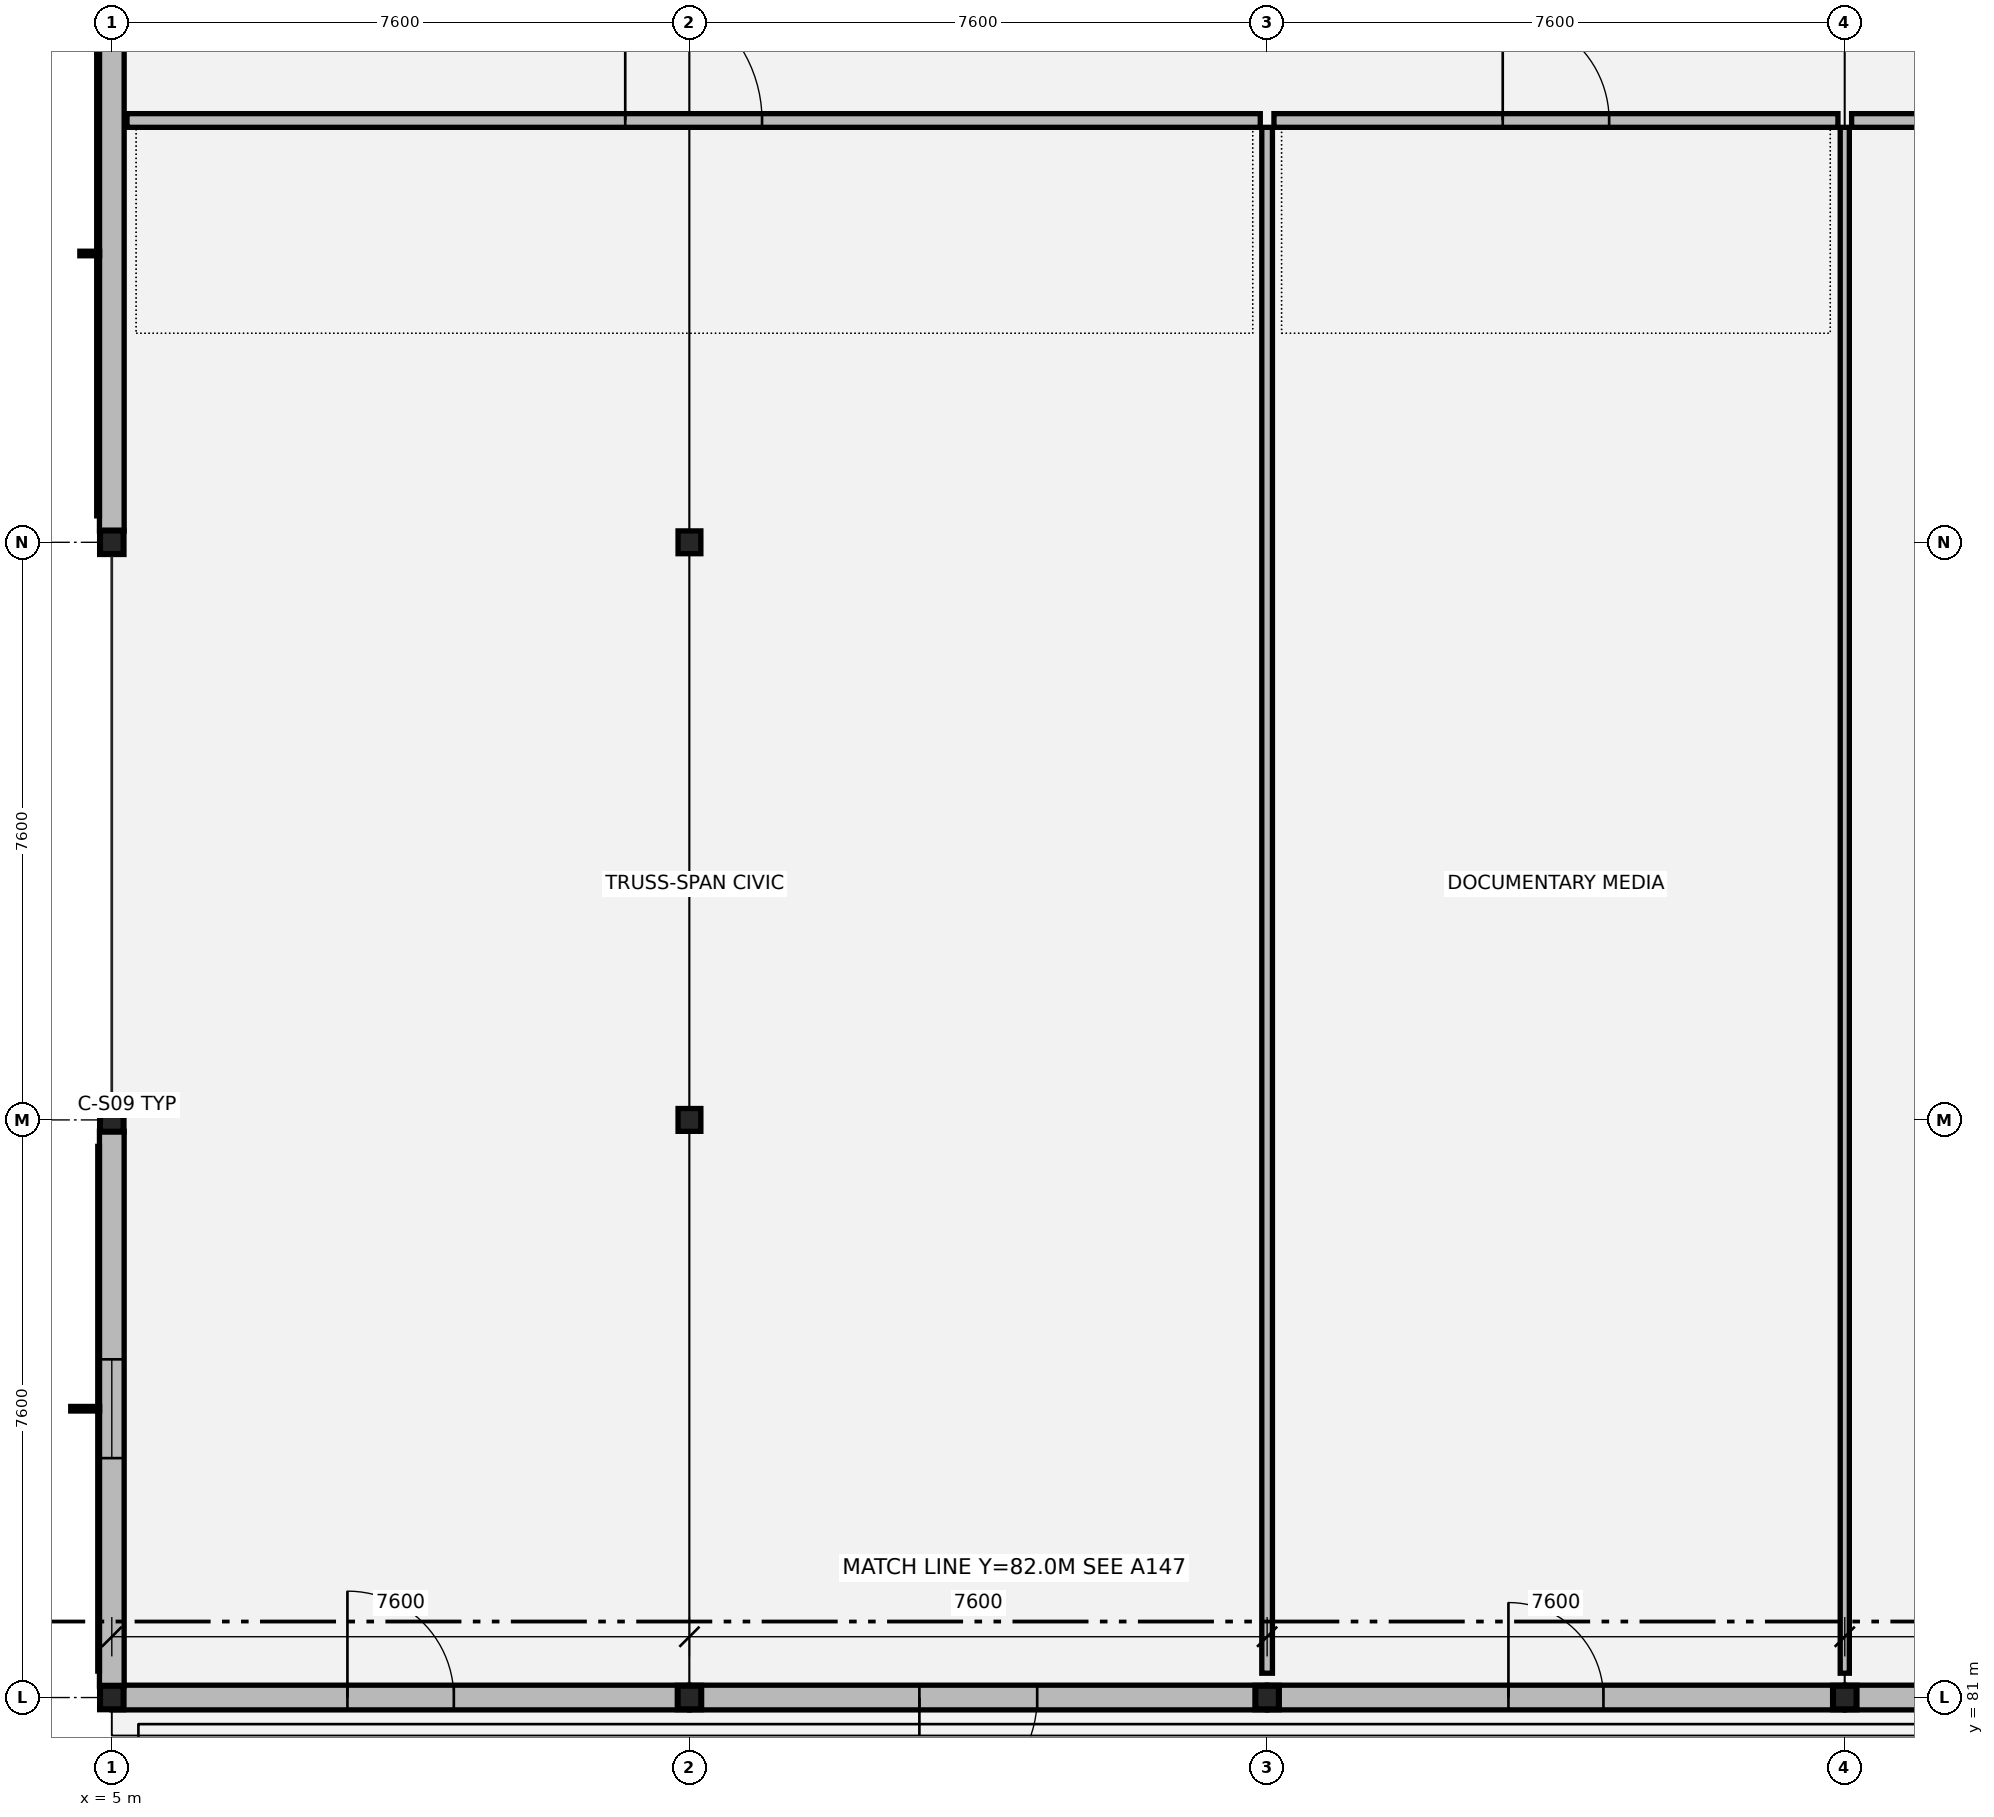
"""IFC4 building model, lengths in metres.
Left out: names, types, materials, properties, quantities, classifications, styles, units other than length and angle.
Written with IfcOpenShell. Run it as: python <this file> out.ifc"""

import sys

from ifc_helpers import new_model, si_unit, direction, frame, frame_2d, origin, origin_2d, place, context, subcontext, project, spatial, rectangle, i_section, extrude, element, fill, save


model = new_model("IFC4")
c1 = context("Model", 3, precision=1e-05, world=origin(), true_north=direction((0.0, 1.0)))
c2 = subcontext(c1, "Body", "Model", "MODEL_VIEW")
j1 = project(units=[si_unit("LENGTHUNIT", "METRE"), si_unit("PLANEANGLEUNIT", "RADIAN")], contexts=[c1])
p1 = place(None, origin())
s1 = spatial("IfcSite", under=j1, at=p1, CompositionType="ELEMENT")
p2 = place(p1, origin())
s2 = spatial("IfcBuilding", under=s1, at=p2, CompositionType="ELEMENT")
p3 = place(p2, frame((0.0, 0.0, 13.26)))
s3 = spatial("IfcBuildingStorey", under=s2, at=p3, CompositionType="ELEMENT", Elevation=13.26)
for number, where, z_axis, x_axis in (
    (1, (5.0, 81.0, 0.0), (0.0, 0.0, 1.0), (1.0, 0.0, 0.0)),
    (2, (5.0, 88.6, 0.0), (0.0, 0.0, 1.0), (1.0, 0.0, 0.0)),
    (3, (5.0, 96.2, 0.0), (0.0, 0.0, 1.0), (1.0, 0.0, 0.0)),
    (4, (12.6, 81.0, 0.0), (0.0, 0.0, 1.0), (1.0, 0.0, 0.0)),
    (5, (12.6, 88.6, 0.0), (0.0, 0.0, 1.0), (1.0, 0.0, 0.0)),
    (6, (12.6, 96.2, 0.0), (0.0, 0.0, 1.0), (1.0, 0.0, 0.0)),
    (7, (20.2, 81.0, 0.0), (0.0, 0.0, 1.0), (1.0, 0.0, 0.0)),
    (8, (27.8, 81.0, 0.0), (0.0, 0.0, 1.0), (1.0, 0.0, 0.0)),
):
    element("IfcColumn", number, at=place(p3, frame(where, z_axis=z_axis, x_axis=x_axis)), inside=s3, PredefinedType="COLUMN", context=c2, shape_type="SweptSolid", body=[
        extrude(i_section(OverallWidth=0.3, OverallDepth=0.3, WebThickness=0.011, FlangeThickness=0.019, at=origin_2d()), origin(), (0.0, 0.0, 1.0), 3.87),
    ])
p4 = place(p3, frame((5.004, 81.0, 0.0), z_axis=(0.0, 0.0, 1.0), x_axis=(1.0, 0.0, 0.0)))
e9 = element("IfcWall", 9, at=p4, inside=s3, PredefinedType="SOLIDWALL", context=c2, shape_type="SweptSolid", body=[
    extrude(rectangle(XDim=7.592, YDim=0.325, at=frame_2d((3.796, 0.0))), origin(), (0.0, 0.0, 1.0), 3.32),
])
p5 = place(p4, frame((3.096, 0.0, 0.0)))
e10 = element("IfcOpeningElement", 10, at=p5, cuts=e9, PredefinedType="OPENING", context=c2, shape_type="SweptSolid", body=[
    extrude(rectangle(XDim=1.4, YDim=2.25, at=frame_2d((0.7, 1.125))), frame((0.0, 0.172, 0.0), z_axis=(0.0, -1.0, 0.0), x_axis=(1.0, 0.0, 0.0)), (0.0, 0.0, 1.0), 0.345),
])
p6 = place(p3, frame((12.604, 81.0, 0.0), z_axis=(0.0, 0.0, 1.0), x_axis=(1.0, 0.0, 0.0)))
e11 = element("IfcWall", 11, at=p6, inside=s3, PredefinedType="SOLIDWALL", context=c2, shape_type="SweptSolid", body=[
    extrude(rectangle(XDim=7.592, YDim=0.325, at=frame_2d((3.796, 0.0))), origin(), (0.0, 0.0, 1.0), 3.32),
])
p7 = place(p6, frame((3.021, 0.0, 0.0)))
e12 = element("IfcOpeningElement", 12, at=p7, cuts=e11, PredefinedType="OPENING", context=c2, shape_type="SweptSolid", body=[
    extrude(rectangle(XDim=1.55, YDim=2.28, at=frame_2d((0.775, 1.14))), frame((0.0, 0.172, 0.0), z_axis=(0.0, -1.0, 0.0), x_axis=(1.0, 0.0, 0.0)), (0.0, 0.0, 1.0), 0.345),
])
p8 = place(p3, frame((20.204, 81.0, 0.0), z_axis=(0.0, 0.0, 1.0), x_axis=(1.0, 0.0, 0.0)))
e13 = element("IfcWall", 13, at=p8, inside=s3, PredefinedType="SOLIDWALL", context=c2, shape_type="SweptSolid", body=[
    extrude(rectangle(XDim=7.592, YDim=0.325, at=frame_2d((3.796, 0.0))), origin(), (0.0, 0.0, 1.0), 3.32),
])
p9 = place(p8, frame((3.171, 0.0, 0.0)))
e14 = element("IfcOpeningElement", 14, at=p9, cuts=e13, PredefinedType="OPENING", context=c2, shape_type="SweptSolid", body=[
    extrude(rectangle(XDim=1.25, YDim=2.2, at=frame_2d((0.625, 1.1))), frame((0.0, 0.172, 0.0), z_axis=(0.0, -1.0, 0.0), x_axis=(1.0, 0.0, 0.0)), (0.0, 0.0, 1.0), 0.345),
])
p10 = place(p3, frame((27.804, 81.0, 0.0), z_axis=(0.0, 0.0, 1.0), x_axis=(1.0, 0.0, 0.0)))
e15 = element("IfcWall", 15, at=p10, inside=s3, PredefinedType="SOLIDWALL", context=c2, shape_type="SweptSolid", body=[
    extrude(rectangle(XDim=7.592, YDim=0.325, at=frame_2d((3.796, 0.0))), origin(), (0.0, 0.0, 1.0), 3.32),
])
p11 = place(p10, frame((3.136, 0.0, 0.0)))
e16 = element("IfcOpeningElement", 16, at=p11, cuts=e15, PredefinedType="OPENING", context=c2, shape_type="SweptSolid", body=[
    extrude(rectangle(XDim=1.32, YDim=2.22, at=frame_2d((0.66, 1.11))), frame((0.0, 0.172, 0.0), z_axis=(0.0, -1.0, 0.0), x_axis=(1.0, 0.0, 0.0)), (0.0, 0.0, 1.0), 0.345),
])
p12 = place(p3, frame((5.0, 103.652, 0.0), z_axis=(0.0, 0.0, 1.0), x_axis=(0.0, -1.0, 0.0)))
e17 = element("IfcWall", 17, at=p12, inside=s3, PredefinedType="SOLIDWALL", context=c2, shape_type="SweptSolid", body=[
    extrude(rectangle(XDim=7.304, YDim=0.325, at=frame_2d((3.652, 0.0))), origin(), (0.0, 0.0, 1.0), 3.48),
])
p13 = place(p3, frame((5.0, 88.452, 0.0), z_axis=(0.0, 0.0, 1.0), x_axis=(0.0, -1.0, 0.0)))
e18 = element("IfcWall", 18, at=p13, inside=s3, PredefinedType="SOLIDWALL", context=c2, shape_type="SweptSolid", body=[
    extrude(rectangle(XDim=7.304, YDim=0.325, at=frame_2d((3.652, 0.0))), origin(), (0.0, 0.0, 1.0), 3.48),
])
p14 = place(p13, frame((3.002, 0.0, 0.8)))
e19 = element("IfcOpeningElement", 19, at=p14, cuts=e18, PredefinedType="OPENING", context=c2, shape_type="SweptSolid", body=[
    extrude(rectangle(XDim=1.3, YDim=2.12, at=frame_2d((0.65, 1.06))), frame((0.0, 0.172, 0.0), z_axis=(0.0, -1.0, 0.0), x_axis=(1.0, 0.0, 0.0)), (0.0, 0.0, 1.0), 0.345),
])
p15 = place(p3, frame((5.2, 101.75, 0.0), z_axis=(0.0, 0.0, 1.0), x_axis=(1.0, 0.0, 0.0)))
e20 = element("IfcWall", 20, at=p15, inside=s3, PredefinedType="PARTITIONING", context=c2, shape_type="SweptSolid", body=[
    extrude(rectangle(XDim=14.91, YDim=0.18, at=frame_2d((7.455, 0.0))), origin(), (0.0, 0.0, 1.0), 3.18),
])
p16 = place(p15, frame((6.555, 0.0, 0.0)))
e21 = element("IfcOpeningElement", 21, at=p16, cuts=e20, PredefinedType="OPENING", context=c2, shape_type="SweptSolid", body=[
    extrude(rectangle(XDim=1.8, YDim=2.3, at=frame_2d((0.9, 1.15))), frame((0.0, 0.1, 0.0), z_axis=(0.0, -1.0, 0.0), x_axis=(1.0, 0.0, 0.0)), (0.0, 0.0, 1.0), 0.2),
])
p17 = place(p3, frame((20.29, 101.75, 0.0), z_axis=(0.0, 0.0, 1.0), x_axis=(1.0, 0.0, 0.0)))
e22 = element("IfcWall", 22, at=p17, inside=s3, PredefinedType="PARTITIONING", context=c2, shape_type="SweptSolid", body=[
    extrude(rectangle(XDim=7.42, YDim=0.18, at=frame_2d((3.71, 0.0))), origin(), (0.0, 0.0, 1.0), 3.18),
])
p18 = place(p17, frame((3.01, 0.0, 0.0)))
e23 = element("IfcOpeningElement", 23, at=p18, cuts=e22, PredefinedType="OPENING", context=c2, shape_type="SweptSolid", body=[
    extrude(rectangle(XDim=1.4, YDim=2.22, at=frame_2d((0.7, 1.11))), frame((0.0, 0.1, 0.0), z_axis=(0.0, -1.0, 0.0), x_axis=(1.0, 0.0, 0.0)), (0.0, 0.0, 1.0), 0.2),
])
p19 = place(p3, frame((27.89, 101.75, 0.0), z_axis=(0.0, 0.0, 1.0), x_axis=(1.0, 0.0, 0.0)))
e24 = element("IfcWall", 24, at=p19, inside=s3, PredefinedType="PARTITIONING", context=c2, shape_type="SweptSolid", body=[
    extrude(rectangle(XDim=9.37, YDim=0.18, at=frame_2d((4.685, 0.0))), origin(), (0.0, 0.0, 1.0), 3.18),
])
p20 = place(p19, frame((4.055, 0.0, 0.0)))
e25 = element("IfcOpeningElement", 25, at=p20, cuts=e24, PredefinedType="OPENING", context=c2, shape_type="SweptSolid", body=[
    extrude(rectangle(XDim=1.26, YDim=2.2, at=frame_2d((0.63, 1.1))), frame((0.0, 0.1, 0.0), z_axis=(0.0, -1.0, 0.0), x_axis=(1.0, 0.0, 0.0)), (0.0, 0.0, 1.0), 0.2),
])
p21 = place(p3, frame((20.2, 81.32, 0.0), z_axis=(0.0, 0.0, 1.0), x_axis=(0.0, 1.0, 0.0)))
e26 = element("IfcWall", 26, at=p21, inside=s3, PredefinedType="PARTITIONING", context=c2, shape_type="SweptSolid", body=[
    extrude(rectangle(XDim=20.34, YDim=0.14, at=frame_2d((10.17, 0.0))), origin(), (0.0, 0.0, 1.0), 3.18),
])
p22 = place(p3, frame((27.8, 81.32, 0.0), z_axis=(0.0, 0.0, 1.0), x_axis=(0.0, 1.0, 0.0)))
e27 = element("IfcWall", 27, at=p22, inside=s3, PredefinedType="PARTITIONING", context=c2, shape_type="SweptSolid", body=[
    extrude(rectangle(XDim=20.34, YDim=0.12, at=frame_2d((10.17, 0.0))), origin(), (0.0, 0.0, 1.0), 3.18),
])
p23 = place(p5, origin())
e28 = element("IfcDoor", 28, at=p23, inside=s3, OperationType="SINGLE_SWING_LEFT", PredefinedType="DOOR", context=c2, shape_type="SweptSolid", body=[
    extrude(rectangle(XDim=1.4, YDim=2.25, at=frame_2d((0.7, 1.125))), frame((0.0, 0.025, 0.0), z_axis=(0.0, -1.0, 0.0), x_axis=(1.0, 0.0, 0.0)), (0.0, 0.0, 1.0), 0.05),
])
fill(e10, e28)
p24 = place(p7, origin())
e29 = element("IfcDoor", 29, at=p24, inside=s3, OperationType="SINGLE_SWING_RIGHT", PredefinedType="DOOR", context=c2, shape_type="SweptSolid", body=[
    extrude(rectangle(XDim=1.55, YDim=2.28, at=frame_2d((0.775, 1.14))), frame((0.0, 0.025, 0.0), z_axis=(0.0, -1.0, 0.0), x_axis=(1.0, 0.0, 0.0)), (0.0, 0.0, 1.0), 0.05),
])
fill(e12, e29)
p25 = place(p9, origin())
e30 = element("IfcDoor", 30, at=p25, inside=s3, OperationType="SINGLE_SWING_LEFT", PredefinedType="DOOR", context=c2, shape_type="SweptSolid", body=[
    extrude(rectangle(XDim=1.25, YDim=2.2, at=frame_2d((0.625, 1.1))), frame((0.0, 0.025, 0.0), z_axis=(0.0, -1.0, 0.0), x_axis=(1.0, 0.0, 0.0)), (0.0, 0.0, 1.0), 0.05),
])
fill(e14, e30)
p26 = place(p14, origin())
e31 = element("IfcWindow", 31, at=p26, inside=s3, PartitioningType="SINGLE_PANEL", PredefinedType="WINDOW", context=c2, shape_type="SweptSolid", body=[
    extrude(rectangle(XDim=1.3, YDim=2.12, at=frame_2d((0.65, 1.06))), frame((0.0, 0.03, 0.0), z_axis=(0.0, -1.0, 0.0), x_axis=(1.0, 0.0, 0.0)), (0.0, 0.0, 1.0), 0.06),
])
fill(e19, e31)
p27 = place(p16, origin())
e32 = element("IfcDoor", 32, at=p27, inside=s3, OperationType="DOUBLE_DOOR_SINGLE_SWING", PredefinedType="DOOR", context=c2, shape_type="SweptSolid", body=[
    extrude(rectangle(XDim=1.8, YDim=2.3, at=frame_2d((0.9, 1.15))), frame((0.0, 0.025, 0.0), z_axis=(0.0, -1.0, 0.0), x_axis=(1.0, 0.0, 0.0)), (0.0, 0.0, 1.0), 0.05),
])
fill(e21, e32)
p28 = place(p18, origin())
e33 = element("IfcDoor", 33, at=p28, inside=s3, OperationType="SINGLE_SWING_LEFT", PredefinedType="DOOR", context=c2, shape_type="SweptSolid", body=[
    extrude(rectangle(XDim=1.4, YDim=2.22, at=frame_2d((0.7, 1.11))), frame((0.0, 0.025, 0.0), z_axis=(0.0, -1.0, 0.0), x_axis=(1.0, 0.0, 0.0)), (0.0, 0.0, 1.0), 0.05),
])
fill(e23, e33)
save(model, sys.argv[1])
